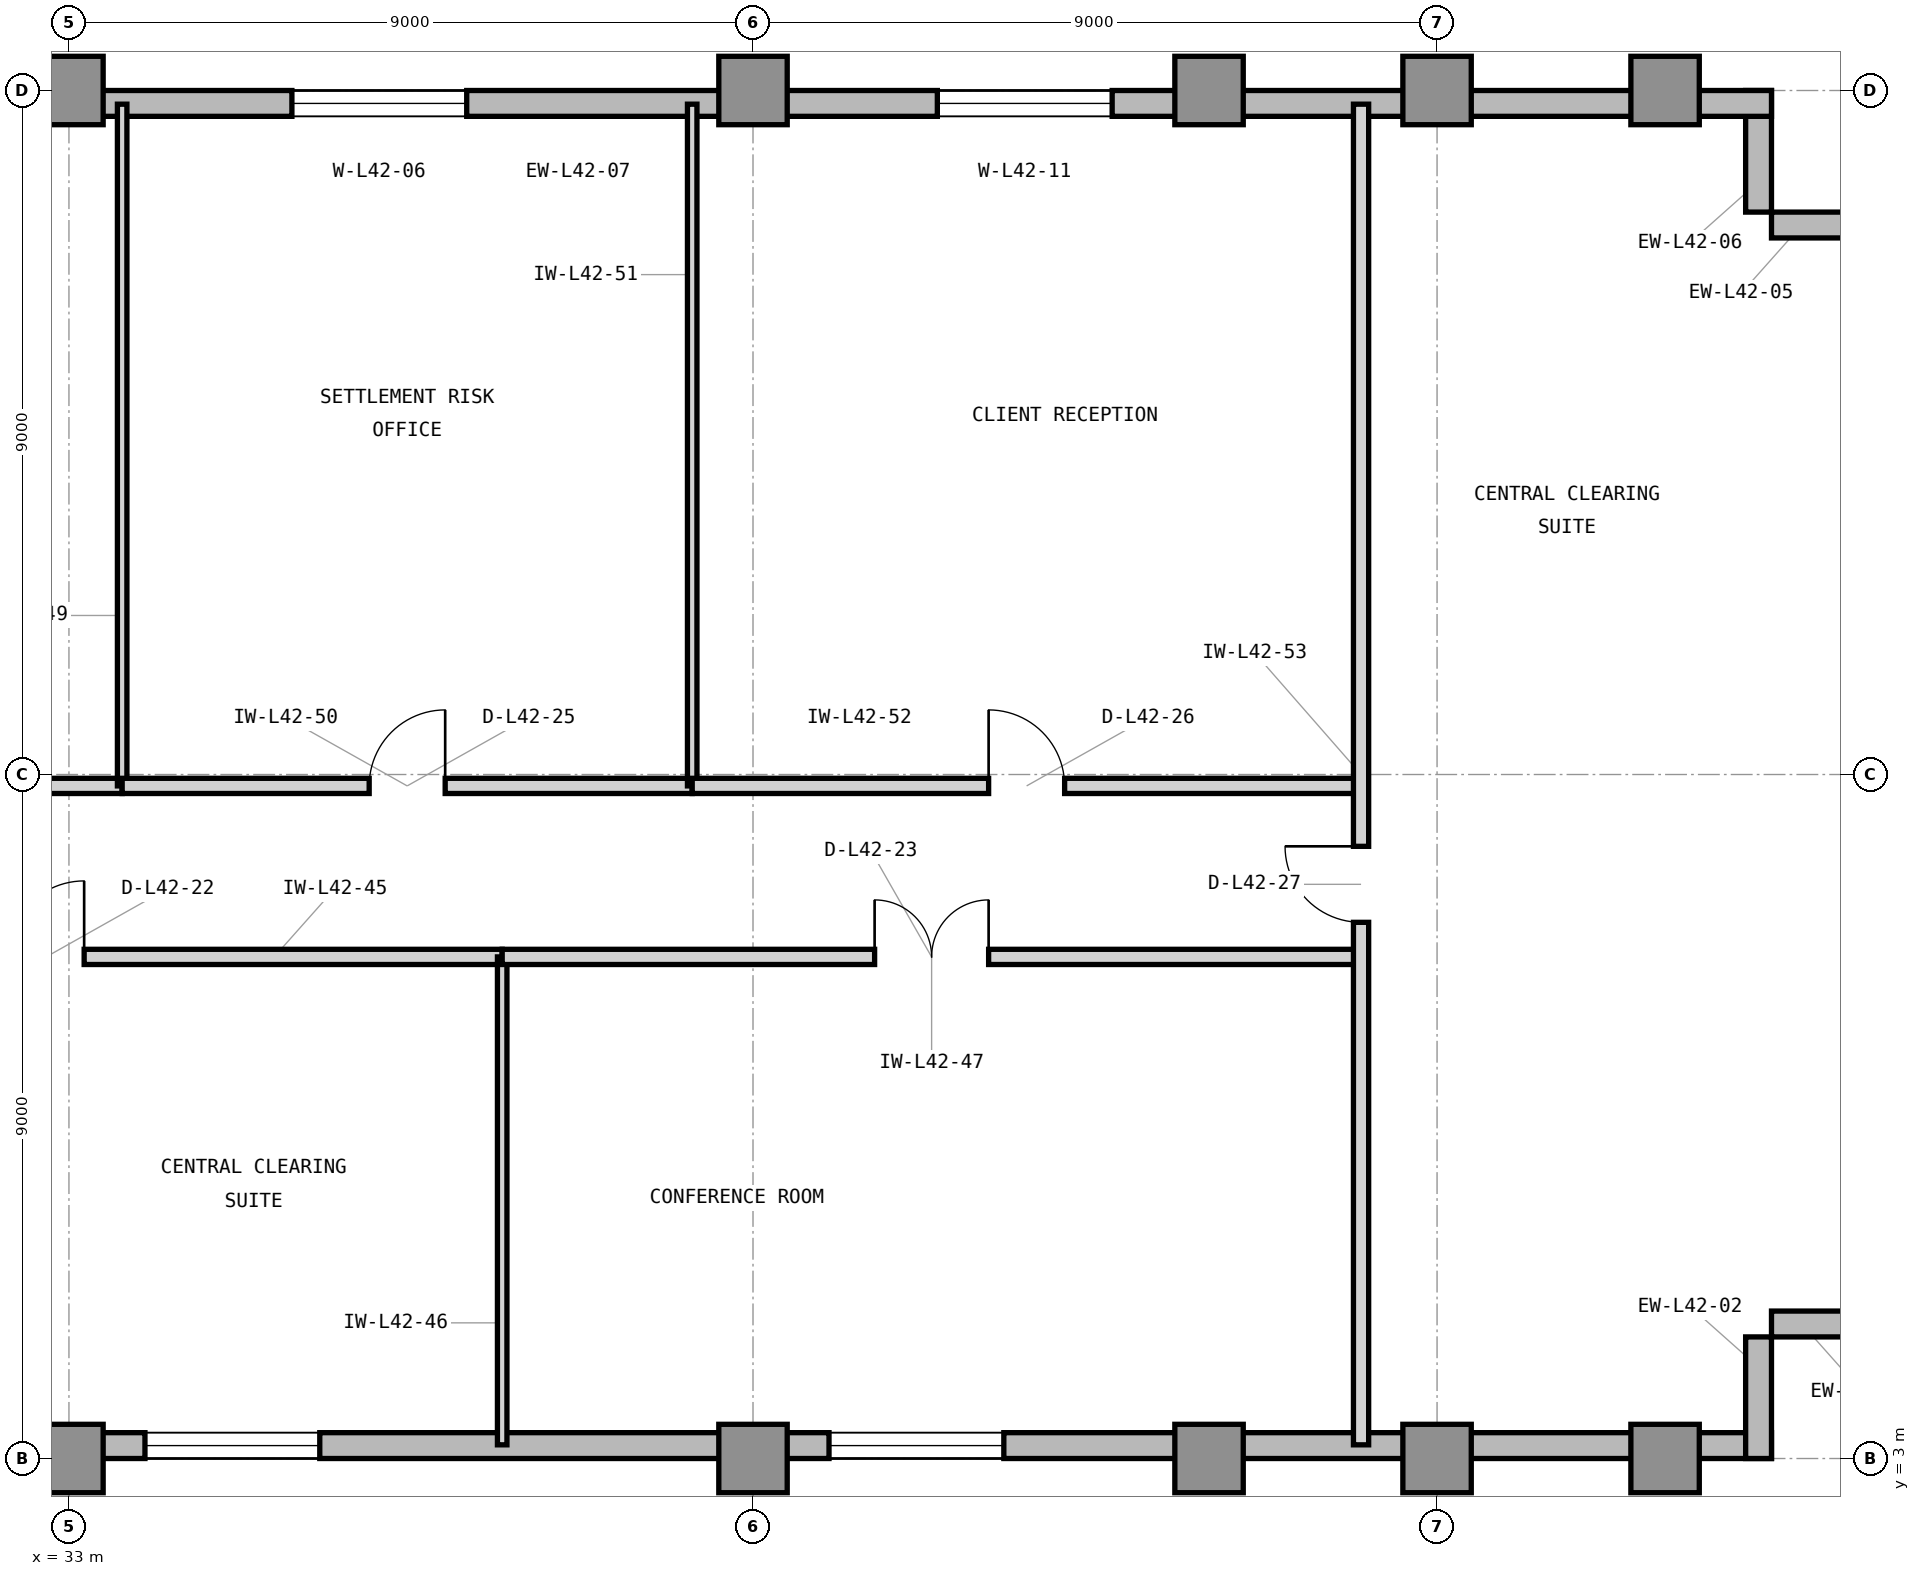
"""IFC4 building model, lengths in metres.
Left out: names, types, materials, properties, quantities, classifications, styles, units other than length and angle.
Written with IfcOpenShell. Run it as: python <this file> out.ifc"""

import sys

from ifc_helpers import new_model, si_unit, direction, frame, frame_2d, origin, origin_2d, place, context, subcontext, project, spatial, rectangle, extrude, element, fill, save


model = new_model("IFC4")
c1 = context("Model", 3, precision=1e-05, world=origin(), true_north=direction((0.0, 1.0)))
c2 = subcontext(c1, "Body", "Model", "MODEL_VIEW")
j1 = project(units=[si_unit("LENGTHUNIT", "METRE"), si_unit("PLANEANGLEUNIT", "RADIAN")], contexts=[c1])
p1 = place(None, origin())
s1 = spatial("IfcSite", under=j1, at=p1, CompositionType="ELEMENT")
p2 = place(p1, origin())
s2 = spatial("IfcBuilding", under=s1, at=p2, CompositionType="ELEMENT")
p3 = place(p2, frame((0.0, 0.0, 176.1)))
s3 = spatial("IfcBuildingStorey", under=s2, at=p3, CompositionType="ELEMENT", Elevation=176.1)
for number, where, z_axis, x_axis in (
    (1, (33.0, 3.0, 0.0), (0.0, 0.0, 1.0), (1.0, 0.0, 0.0)),
    (2, (33.0, 21.0, 0.0), (0.0, 0.0, 1.0), (1.0, 0.0, 0.0)),
    (3, (42.0, 3.0, 0.0), (0.0, 0.0, 1.0), (1.0, 0.0, 0.0)),
    (4, (42.0, 21.0, 0.0), (0.0, 0.0, 1.0), (1.0, 0.0, 0.0)),
    (5, (48.0, 3.0, 0.0), (0.0, 0.0, 1.0), (1.0, 0.0, 0.0)),
    (6, (48.0, 21.0, 0.0), (0.0, 0.0, 1.0), (1.0, 0.0, 0.0)),
    (7, (51.0, 3.0, 0.0), (0.0, 0.0, 1.0), (1.0, 0.0, 0.0)),
    (8, (51.0, 21.0, 0.0), (0.0, 0.0, 1.0), (1.0, 0.0, 0.0)),
    (9, (54.0, 3.0, 0.0), (0.0, 0.0, 1.0), (1.0, 0.0, 0.0)),
    (10, (54.0, 21.0, 0.0), (0.0, 0.0, 1.0), (1.0, 0.0, 0.0)),
):
    element("IfcColumn", number, at=place(p3, frame(where, z_axis=z_axis, x_axis=x_axis)), inside=s3, PredefinedType="COLUMN", context=c2, shape_type="SweptSolid", body=[
        extrude(rectangle(XDim=0.9, YDim=0.9, at=origin_2d()), origin(), (0.0, 0.0, 1.0), 3.9),
    ])
p4 = place(p3, frame((23.9, 3.17, 0.0), z_axis=(0.0, 0.0, 1.0), x_axis=(1.0, 0.0, 0.0)))
e11 = element("IfcWall", 11, at=p4, inside=s3, PredefinedType="STANDARD", context=c2, shape_type="SweptSolid", body=[
    extrude(rectangle(XDim=31.5, YDim=0.34, at=frame_2d((15.75, 0.0))), origin(), (0.0, 0.0, 1.0), 3.7),
])
p5 = place(p4, frame((5.6, 0.0, 0.9)))
e12 = element("IfcOpeningElement", 12, at=p5, cuts=e11, PredefinedType="OPENING", context=c2, shape_type="SweptSolid", body=[
    extrude(rectangle(XDim=2.3, YDim=2.2, at=frame_2d((1.15, 1.1))), frame((0.0, 0.18, 0.0), z_axis=(0.0, -1.0, 0.0), x_axis=(1.0, 0.0, 0.0)), (0.0, 0.0, 1.0), 0.36),
])
p6 = place(p4, frame((10.1, 0.0, 0.9)))
e13 = element("IfcOpeningElement", 13, at=p6, cuts=e11, PredefinedType="OPENING", context=c2, shape_type="SweptSolid", body=[
    extrude(rectangle(XDim=2.3, YDim=2.2, at=frame_2d((1.15, 1.1))), frame((0.0, 0.18, 0.0), z_axis=(0.0, -1.0, 0.0), x_axis=(1.0, 0.0, 0.0)), (0.0, 0.0, 1.0), 0.36),
])
p7 = place(p4, frame((19.1, 0.0, 0.9)))
e14 = element("IfcOpeningElement", 14, at=p7, cuts=e11, PredefinedType="OPENING", context=c2, shape_type="SweptSolid", body=[
    extrude(rectangle(XDim=2.3, YDim=2.2, at=frame_2d((1.15, 1.1))), frame((0.0, 0.18, 0.0), z_axis=(0.0, -1.0, 0.0), x_axis=(1.0, 0.0, 0.0)), (0.0, 0.0, 1.0), 0.36),
])
p8 = place(p4, frame((0.9, 0.0, 0.9)))
e15 = element("IfcOpeningElement", 15, at=p8, cuts=e11, PredefinedType="OPENING", context=c2, shape_type="SweptSolid", body=[
    extrude(rectangle(XDim=1.6, YDim=2.2, at=frame_2d((0.8, 1.1))), frame((0.0, 0.18, 0.0), z_axis=(0.0, -1.0, 0.0), x_axis=(1.0, 0.0, 0.0)), (0.0, 0.0, 1.0), 0.36),
])
for number, where, z_axis, x_axis in (
    (16, (55.23, 3.0, 0.0), (0.0, 0.0, 1.0), (0.0, 1.0, 0.0)),
    (17, (55.4, 4.77, 0.0), (0.0, 0.0, 1.0), (1.0, 0.0, 0.0)),
    (18, (57.0, 19.23, 0.0), (0.0, 0.0, 1.0), (-1.0, 0.0, 0.0)),
    (19, (55.23, 19.4, 0.0), (0.0, 0.0, 1.0), (0.0, 1.0, 0.0)),
):
    element("IfcWall", number, at=place(p3, frame(where, z_axis=z_axis, x_axis=x_axis)), inside=s3, PredefinedType="STANDARD", context=c2, shape_type="SweptSolid", body=[
        extrude(rectangle(XDim=1.6, YDim=0.34, at=frame_2d((0.8, 0.0))), origin(), (0.0, 0.0, 1.0), 3.7),
    ])
p9 = place(p3, frame((55.4, 20.83, 0.0), z_axis=(0.0, 0.0, 1.0), x_axis=(-1.0, 0.0, 0.0)))
e20 = element("IfcWall", 20, at=p9, inside=s3, PredefinedType="STANDARD", context=c2, shape_type="SweptSolid", body=[
    extrude(rectangle(XDim=31.4, YDim=0.34, at=frame_2d((15.7, 0.0))), origin(), (0.0, 0.0, 1.0), 3.7),
])
p10 = place(p9, frame((17.167, 0.0, 0.9)))
e21 = element("IfcOpeningElement", 21, at=p10, cuts=e20, PredefinedType="OPENING", context=c2, shape_type="SweptSolid", body=[
    extrude(rectangle(XDim=2.3, YDim=2.2, at=frame_2d((1.15, 1.1))), frame((0.0, 0.18, 0.0), z_axis=(0.0, -1.0, 0.0), x_axis=(1.0, 0.0, 0.0)), (0.0, 0.0, 1.0), 0.36),
])
p11 = place(p9, frame((29.046, 0.0, 0.9)))
e22 = element("IfcOpeningElement", 22, at=p11, cuts=e20, PredefinedType="OPENING", context=c2, shape_type="SweptSolid", body=[
    extrude(rectangle(XDim=1.6, YDim=2.2, at=frame_2d((0.8, 1.1))), frame((0.0, 0.18, 0.0), z_axis=(0.0, -1.0, 0.0), x_axis=(1.0, 0.0, 0.0)), (0.0, 0.0, 1.0), 0.36),
])
p12 = place(p9, frame((8.675, 0.0, 0.9)))
e23 = element("IfcOpeningElement", 23, at=p12, cuts=e20, PredefinedType="OPENING", context=c2, shape_type="SweptSolid", body=[
    extrude(rectangle(XDim=2.3, YDim=2.2, at=frame_2d((1.15, 1.1))), frame((0.0, 0.18, 0.0), z_axis=(0.0, -1.0, 0.0), x_axis=(1.0, 0.0, 0.0)), (0.0, 0.0, 1.0), 0.36),
])
p13 = place(p3, frame((26.7, 9.6, 0.0), z_axis=(0.0, 0.0, 1.0), x_axis=(1.0, 0.0, 0.0)))
e24 = element("IfcWall", 24, at=p13, inside=s3, PredefinedType="PARTITIONING", context=c2, shape_type="SweptSolid", body=[
    extrude(rectangle(XDim=12.0, YDim=0.2, at=frame_2d((6.0, 0.0))), origin(), (0.0, 0.0, 1.0), 3.69),
])
p14 = place(p13, frame((5.5, 0.0, 0.0)))
e25 = element("IfcOpeningElement", 25, at=p14, cuts=e24, PredefinedType="OPENING", context=c2, shape_type="SweptSolid", body=[
    extrude(rectangle(XDim=1.0, YDim=2.15, at=frame_2d((0.5, 1.075))), frame((0.0, 0.11, 0.0), z_axis=(0.0, -1.0, 0.0), x_axis=(1.0, 0.0, 0.0)), (0.0, 0.0, 1.0), 0.22),
])
p15 = place(p3, frame((38.7, 3.18, 0.0), z_axis=(0.0, 0.0, 1.0), x_axis=(0.0, 1.0, 0.0)))
e26 = element("IfcWall", 26, at=p15, inside=s3, PredefinedType="PARTITIONING", context=c2, shape_type="SweptSolid", body=[
    extrude(rectangle(XDim=6.42, YDim=0.125, at=frame_2d((3.21, 0.0))), origin(), (0.0, 0.0, 1.0), 3.69),
])
p16 = place(p3, frame((38.7, 9.6, 0.0), z_axis=(0.0, 0.0, 1.0), x_axis=(1.0, 0.0, 0.0)))
e27 = element("IfcWall", 27, at=p16, inside=s3, PredefinedType="PARTITIONING", context=c2, shape_type="SweptSolid", body=[
    extrude(rectangle(XDim=11.3, YDim=0.2, at=frame_2d((5.65, 0.0))), origin(), (0.0, 0.0, 1.0), 3.69),
])
p17 = place(p16, frame((4.9, 0.0, 0.0)))
e28 = element("IfcOpeningElement", 28, at=p17, cuts=e27, PredefinedType="OPENING", context=c2, shape_type="SweptSolid", body=[
    extrude(rectangle(XDim=1.5, YDim=2.3, at=frame_2d((0.75, 1.15))), frame((0.0, 0.11, 0.0), z_axis=(0.0, -1.0, 0.0), x_axis=(1.0, 0.0, 0.0)), (0.0, 0.0, 1.0), 0.22),
])
p18 = place(p3, frame((26.7, 11.85, 0.0), z_axis=(0.0, 0.0, 1.0), x_axis=(1.0, 0.0, 0.0)))
e29 = element("IfcWall", 29, at=p18, inside=s3, PredefinedType="PARTITIONING", context=c2, shape_type="SweptSolid", body=[
    extrude(rectangle(XDim=7.0, YDim=0.2, at=frame_2d((3.5, 0.0))), origin(), (0.0, 0.0, 1.0), 3.69),
])
p19 = place(p18, frame((3.0, 0.0, 0.0)))
e30 = element("IfcOpeningElement", 30, at=p19, cuts=e29, PredefinedType="OPENING", context=c2, shape_type="SweptSolid", body=[
    extrude(rectangle(XDim=1.0, YDim=2.15, at=frame_2d((0.5, 1.075))), frame((0.0, 0.11, 0.0), z_axis=(0.0, -1.0, 0.0), x_axis=(1.0, 0.0, 0.0)), (0.0, 0.0, 1.0), 0.22),
])
p20 = place(p3, frame((33.7, 11.85, 0.0), z_axis=(0.0, 0.0, 1.0), x_axis=(0.0, 1.0, 0.0)))
e31 = element("IfcWall", 31, at=p20, inside=s3, PredefinedType="PARTITIONING", context=c2, shape_type="SweptSolid", body=[
    extrude(rectangle(XDim=8.97, YDim=0.125, at=frame_2d((4.485, 0.0))), origin(), (0.0, 0.0, 1.0), 3.69),
])
p21 = place(p3, frame((33.7, 11.85, 0.0), z_axis=(0.0, 0.0, 1.0), x_axis=(1.0, 0.0, 0.0)))
e32 = element("IfcWall", 32, at=p21, inside=s3, PredefinedType="PARTITIONING", context=c2, shape_type="SweptSolid", body=[
    extrude(rectangle(XDim=7.5, YDim=0.2, at=frame_2d((3.75, 0.0))), origin(), (0.0, 0.0, 1.0), 3.69),
])
p22 = place(p21, frame((3.25, 0.0, 0.0)))
e33 = element("IfcOpeningElement", 33, at=p22, cuts=e32, PredefinedType="OPENING", context=c2, shape_type="SweptSolid", body=[
    extrude(rectangle(XDim=1.0, YDim=2.15, at=frame_2d((0.5, 1.075))), frame((0.0, 0.11, 0.0), z_axis=(0.0, -1.0, 0.0), x_axis=(1.0, 0.0, 0.0)), (0.0, 0.0, 1.0), 0.22),
])
p23 = place(p3, frame((41.2, 11.85, 0.0), z_axis=(0.0, 0.0, 1.0), x_axis=(0.0, 1.0, 0.0)))
e34 = element("IfcWall", 34, at=p23, inside=s3, PredefinedType="PARTITIONING", context=c2, shape_type="SweptSolid", body=[
    extrude(rectangle(XDim=8.97, YDim=0.125, at=frame_2d((4.485, 0.0))), origin(), (0.0, 0.0, 1.0), 3.69),
])
p24 = place(p3, frame((41.2, 11.85, 0.0), z_axis=(0.0, 0.0, 1.0), x_axis=(1.0, 0.0, 0.0)))
e35 = element("IfcWall", 35, at=p24, inside=s3, PredefinedType="PARTITIONING", context=c2, shape_type="SweptSolid", body=[
    extrude(rectangle(XDim=8.8, YDim=0.2, at=frame_2d((4.4, 0.0))), origin(), (0.0, 0.0, 1.0), 3.69),
])
p25 = place(p24, frame((3.9, 0.0, 0.0)))
e36 = element("IfcOpeningElement", 36, at=p25, cuts=e35, PredefinedType="OPENING", context=c2, shape_type="SweptSolid", body=[
    extrude(rectangle(XDim=1.0, YDim=2.15, at=frame_2d((0.5, 1.075))), frame((0.0, 0.11, 0.0), z_axis=(0.0, -1.0, 0.0), x_axis=(1.0, 0.0, 0.0)), (0.0, 0.0, 1.0), 0.22),
])
p26 = place(p3, frame((50.0, 3.18, 0.0), z_axis=(0.0, 0.0, 1.0), x_axis=(0.0, 1.0, 0.0)))
e37 = element("IfcWall", 37, at=p26, inside=s3, PredefinedType="PARTITIONING", context=c2, shape_type="SweptSolid", body=[
    extrude(rectangle(XDim=17.64, YDim=0.2, at=frame_2d((8.82, 0.0))), origin(), (0.0, 0.0, 1.0), 3.69),
])
p27 = place(p26, frame((6.875, 0.0, 0.0)))
e38 = element("IfcOpeningElement", 38, at=p27, cuts=e37, PredefinedType="OPENING", context=c2, shape_type="SweptSolid", body=[
    extrude(rectangle(XDim=1.0, YDim=2.15, at=frame_2d((0.5, 1.075))), frame((0.0, 0.11, 0.0), z_axis=(0.0, -1.0, 0.0), x_axis=(1.0, 0.0, 0.0)), (0.0, 0.0, 1.0), 0.22),
])
p28 = place(p6, origin())
e39 = element("IfcWindow", 39, at=p28, inside=s3, PartitioningType="SINGLE_PANEL", PredefinedType="WINDOW", context=c2, shape_type="SweptSolid", body=[
    extrude(rectangle(XDim=2.3, YDim=2.2, at=frame_2d((1.15, 1.1))), frame((0.0, 0.11, 0.0), z_axis=(0.0, -1.0, 0.0), x_axis=(1.0, 0.0, 0.0)), (0.0, 0.0, 1.0), 0.06),
])
fill(e13, e39)
p29 = place(p7, origin())
e40 = element("IfcWindow", 40, at=p29, inside=s3, PartitioningType="SINGLE_PANEL", PredefinedType="WINDOW", context=c2, shape_type="SweptSolid", body=[
    extrude(rectangle(XDim=2.3, YDim=2.2, at=frame_2d((1.15, 1.1))), frame((0.0, 0.11, 0.0), z_axis=(0.0, -1.0, 0.0), x_axis=(1.0, 0.0, 0.0)), (0.0, 0.0, 1.0), 0.06),
])
fill(e14, e40)
p30 = place(p10, origin())
e41 = element("IfcWindow", 41, at=p30, inside=s3, PartitioningType="SINGLE_PANEL", PredefinedType="WINDOW", context=c2, shape_type="SweptSolid", body=[
    extrude(rectangle(XDim=2.3, YDim=2.2, at=frame_2d((1.15, 1.1))), frame((0.0, 0.11, 0.0), z_axis=(0.0, -1.0, 0.0), x_axis=(1.0, 0.0, 0.0)), (0.0, 0.0, 1.0), 0.06),
])
fill(e21, e41)
p31 = place(p14, origin())
e42 = element("IfcDoor", 42, at=p31, inside=s3, OperationType="SINGLE_SWING_RIGHT", PredefinedType="DOOR", context=c2, shape_type="SweptSolid", body=[
    extrude(rectangle(XDim=1.0, YDim=2.15, at=frame_2d((0.5, 1.075))), frame((0.0, 0.025, 0.0), z_axis=(0.0, -1.0, 0.0), x_axis=(1.0, 0.0, 0.0)), (0.0, 0.0, 1.0), 0.05),
])
fill(e25, e42)
p32 = place(p17, origin())
e43 = element("IfcDoor", 43, at=p32, inside=s3, OperationType="DOUBLE_DOOR_SINGLE_SWING", PredefinedType="DOOR", context=c2, shape_type="SweptSolid", body=[
    extrude(rectangle(XDim=1.5, YDim=2.3, at=frame_2d((0.75, 1.15))), frame((0.0, 0.025, 0.0), z_axis=(0.0, -1.0, 0.0), x_axis=(1.0, 0.0, 0.0)), (0.0, 0.0, 1.0), 0.05),
])
fill(e28, e43)
p33 = place(p22, origin())
e44 = element("IfcDoor", 44, at=p33, inside=s3, OperationType="SINGLE_SWING_RIGHT", PredefinedType="DOOR", context=c2, shape_type="SweptSolid", body=[
    extrude(rectangle(XDim=1.0, YDim=2.15, at=frame_2d((0.5, 1.075))), frame((0.0, 0.025, 0.0), z_axis=(0.0, -1.0, 0.0), x_axis=(1.0, 0.0, 0.0)), (0.0, 0.0, 1.0), 0.05),
])
fill(e33, e44)
p34 = place(p25, origin())
e45 = element("IfcDoor", 45, at=p34, inside=s3, OperationType="SINGLE_SWING_LEFT", PredefinedType="DOOR", context=c2, shape_type="SweptSolid", body=[
    extrude(rectangle(XDim=1.0, YDim=2.15, at=frame_2d((0.5, 1.075))), frame((0.0, 0.025, 0.0), z_axis=(0.0, -1.0, 0.0), x_axis=(1.0, 0.0, 0.0)), (0.0, 0.0, 1.0), 0.05),
])
fill(e36, e45)
p35 = place(p27, origin())
e46 = element("IfcDoor", 46, at=p35, inside=s3, OperationType="SINGLE_SWING_RIGHT", PredefinedType="DOOR", context=c2, shape_type="SweptSolid", body=[
    extrude(rectangle(XDim=1.0, YDim=2.15, at=frame_2d((0.5, 1.075))), frame((0.0, 0.025, 0.0), z_axis=(0.0, -1.0, 0.0), x_axis=(1.0, 0.0, 0.0)), (0.0, 0.0, 1.0), 0.05),
])
fill(e38, e46)
p36 = place(p12, origin())
e47 = element("IfcWindow", 47, at=p36, inside=s3, PartitioningType="SINGLE_PANEL", PredefinedType="WINDOW", context=c2, shape_type="SweptSolid", body=[
    extrude(rectangle(XDim=2.3, YDim=2.2, at=frame_2d((1.15, 1.1))), frame((0.0, 0.11, 0.0), z_axis=(0.0, -1.0, 0.0), x_axis=(1.0, 0.0, 0.0)), (0.0, 0.0, 1.0), 0.06),
])
fill(e23, e47)
save(model, sys.argv[1])
